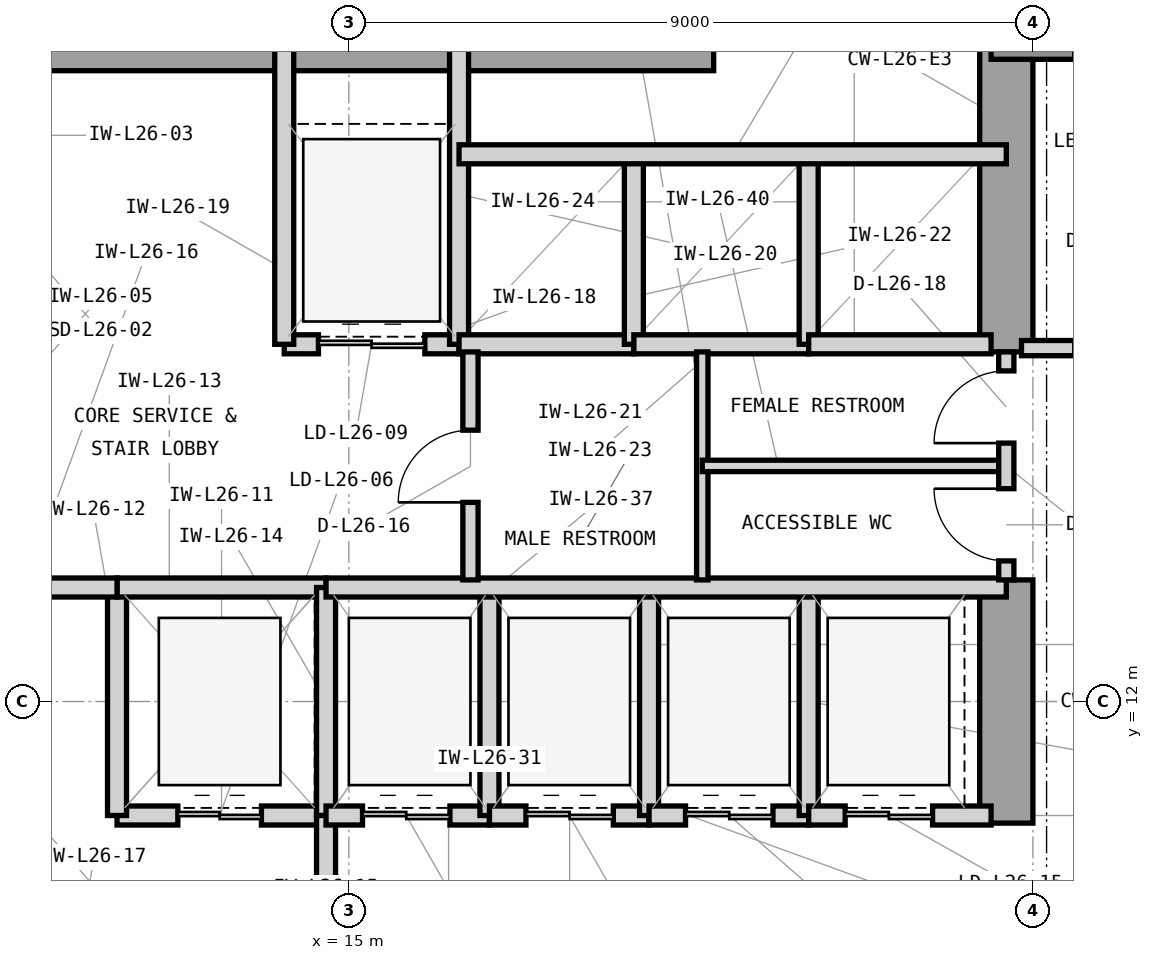
"""IFC4 building model, lengths in metres.
Left out: names, types, materials, properties, quantities, classifications, styles, units other than length and angle.
Written with IfcOpenShell. Run it as: python <this file> out.ifc"""

import sys

from ifc_helpers import new_model, si_unit, direction, frame, frame_2d, origin, origin_2d, place, context, subcontext, project, spatial, rectangle, extrude, element, fill, save


model = new_model("IFC4")
c1 = context("Model", 3, precision=1e-05, world=origin(), true_north=direction((0.0, 1.0)))
c2 = subcontext(c1, "Body", "Model", "MODEL_VIEW")
j1 = project(units=[si_unit("LENGTHUNIT", "METRE"), si_unit("PLANEANGLEUNIT", "RADIAN")], contexts=[c1])
p1 = place(None, origin())
s1 = spatial("IfcSite", under=j1, at=p1, CompositionType="ELEMENT")
p2 = place(p1, origin())
s2 = spatial("IfcBuilding", under=s1, at=p2, CompositionType="ELEMENT")
p3 = place(p2, frame((0.0, 0.0, 112.8)))
s3 = spatial("IfcBuildingStorey", under=s2, at=p3, CompositionType="ELEMENT", Elevation=112.8)
p4 = place(p3, frame((7.475, 20.65, 0.0), z_axis=(0.0, 0.0, 1.0), x_axis=(1.0, 0.0, 0.0)))
e1 = element("IfcWall", 1, at=p4, inside=s3, PredefinedType="SHEAR", context=c2, shape_type="SweptSolid", body=[
    extrude(rectangle(XDim=12.325, YDim=0.7, at=frame_2d((6.163, 0.0))), origin(), (0.0, 0.0, 1.0), 3.9),
])
p5 = place(p3, frame((23.65, 10.4, 0.0), z_axis=(0.0, 0.0, 1.0), x_axis=(0.0, 1.0, 0.0)))
e2 = element("IfcWall", 2, at=p5, inside=s3, PredefinedType="SHEAR", context=c2, shape_type="SweptSolid", body=[
    extrude(rectangle(XDim=3.2, YDim=0.7, at=frame_2d((1.6, 0.0))), origin(), (0.0, 0.0, 1.0), 3.9),
])
p6 = place(p3, frame((23.65, 16.6, 0.0), z_axis=(0.0, 0.0, 1.0), x_axis=(0.0, 1.0, 0.0)))
e3 = element("IfcWall", 3, at=p6, inside=s3, PredefinedType="SHEAR", context=c2, shape_type="SweptSolid", body=[
    extrude(rectangle(XDim=4.05, YDim=0.7, at=frame_2d((2.025, 0.0))), origin(), (0.0, 0.0, 1.0), 3.9),
])
p7 = place(p3, frame((24.0, 21.0, 0.0), z_axis=(0.0, 0.0, 1.0), x_axis=(1.0, 0.0, 0.0)))
e4 = element("IfcColumn", 4, at=p7, inside=s3, PredefinedType="COLUMN", context=c2, shape_type="SweptSolid", body=[
    extrude(rectangle(XDim=1.1, YDim=1.1, at=origin_2d()), origin(), (0.0, 0.0, 1.0), 3.9),
])
p8 = place(p3, frame((11.95, 10.5, 0.0), z_axis=(0.0, 0.0, 1.0), x_axis=(1.0, 0.0, 0.0)))
e5 = element("IfcWall", 5, at=p8, inside=s3, PredefinedType="PARTITIONING", context=c2, shape_type="SweptSolid", body=[
    extrude(rectangle(XDim=2.75, YDim=0.25, at=frame_2d((1.375, 0.0))), origin(), (0.0, 0.0, 1.0), 3.227),
])
p9 = place(p8, frame((0.8, 0.0, 0.0)))
e6 = element("IfcOpeningElement", 6, at=p9, cuts=e5, PredefinedType="OPENING", context=c2, shape_type="SweptSolid", body=[
    extrude(rectangle(XDim=1.1, YDim=2.25, at=frame_2d((0.55, 1.125))), frame((0.0, 0.135, 0.0), z_axis=(0.0, -1.0, 0.0), x_axis=(1.0, 0.0, 0.0)), (0.0, 0.0, 1.0), 0.27),
])
p10 = place(p3, frame((11.95, 10.5, 0.0), z_axis=(0.0, 0.0, 1.0), x_axis=(0.0, 1.0, 0.0)))
e7 = element("IfcWall", 7, at=p10, inside=s3, PredefinedType="PARTITIONING", context=c2, shape_type="SweptSolid", body=[
    extrude(rectangle(XDim=3.0, YDim=0.25, at=frame_2d((1.5, 0.0))), origin(), (0.0, 0.0, 1.0), 3.69),
])
p11 = place(p3, frame((11.95, 13.5, 0.0), z_axis=(0.0, 0.0, 1.0), x_axis=(1.0, 0.0, 0.0)))
e8 = element("IfcWall", 8, at=p11, inside=s3, PredefinedType="PARTITIONING", context=c2, shape_type="SweptSolid", body=[
    extrude(rectangle(XDim=2.75, YDim=0.25, at=frame_2d((1.375, 0.0))), origin(), (0.0, 0.0, 1.0), 3.227),
])
p12 = place(p3, frame((14.7, 10.5, 0.0), z_axis=(0.0, 0.0, 1.0), x_axis=(0.0, 1.0, 0.0)))
e9 = element("IfcWall", 9, at=p12, inside=s3, PredefinedType="PARTITIONING", context=c2, shape_type="SweptSolid", body=[
    extrude(rectangle(XDim=3.0, YDim=0.25, at=frame_2d((1.5, 0.0))), origin(), (0.0, 0.0, 1.0), 3.69),
])
p13 = place(p3, frame((14.7, 6.7, 0.0), z_axis=(0.0, 0.0, 1.0), x_axis=(0.0, 1.0, 0.0)))
e10 = element("IfcWall", 10, at=p13, inside=s3, PredefinedType="PARTITIONING", context=c2, shape_type="SweptSolid", body=[
    extrude(rectangle(XDim=3.8, YDim=0.25, at=frame_2d((1.9, 0.0))), origin(), (0.0, 0.0, 1.0), 3.69),
])
p14 = place(p13, frame((1.3, 0.0, 0.0)))
e11 = element("IfcOpeningElement", 11, at=p14, cuts=e10, PredefinedType="OPENING", context=c2, shape_type="SweptSolid", body=[
    extrude(rectangle(XDim=1.2, YDim=2.2, at=frame_2d((0.6, 1.1))), frame((0.0, 0.135, 0.0), z_axis=(0.0, -1.0, 0.0), x_axis=(1.0, 0.0, 0.0)), (0.0, 0.0, 1.0), 0.27),
])
p15 = place(p3, frame((10.33, 13.5, 0.0), z_axis=(0.0, 0.0, 1.0), x_axis=(1.0, 0.0, 0.0)))
e12 = element("IfcWall", 12, at=p15, inside=s3, PredefinedType="PARTITIONING", context=c2, shape_type="SweptSolid", body=[
    extrude(rectangle(XDim=1.62, YDim=0.25, at=frame_2d((0.81, 0.0))), origin(), (0.0, 0.0, 1.0), 3.227),
])
p16 = place(p3, frame((14.15, 16.7, 0.0), z_axis=(0.0, 0.0, 1.0), x_axis=(1.0, 0.0, 0.0)))
e13 = element("IfcWall", 13, at=p16, inside=s3, PredefinedType="PARTITIONING", context=c2, shape_type="SweptSolid", body=[
    extrude(rectangle(XDim=2.3, YDim=0.25, at=frame_2d((1.15, 0.0))), origin(), (0.0, 0.0, 1.0), 3.227),
])
p17 = place(p16, frame((0.45, 0.0, 0.0)))
e14 = element("IfcOpeningElement", 14, at=p17, cuts=e13, PredefinedType="OPENING", context=c2, shape_type="SweptSolid", body=[
    extrude(rectangle(XDim=1.4, YDim=2.35, at=frame_2d((0.7, 1.175))), frame((0.0, 0.135, 0.0), z_axis=(0.0, -1.0, 0.0), x_axis=(1.0, 0.0, 0.0)), (0.0, 0.0, 1.0), 0.27),
])
for number, where, z_axis, x_axis in (
    (15, (14.15, 16.7, 0.0), (0.0, 0.0, 1.0), (0.0, 1.0, 0.0)),
    (16, (16.45, 16.7, 0.0), (0.0, 0.0, 1.0), (0.0, 1.0, 0.0)),
):
    element("IfcWall", number, at=place(p3, frame(where, z_axis=z_axis, x_axis=x_axis)), inside=s3, PredefinedType="PARTITIONING", context=c2, shape_type="SweptSolid", body=[
        extrude(rectangle(XDim=3.95, YDim=0.25, at=frame_2d((1.975, 0.0))), origin(), (0.0, 0.0, 1.0), 3.69),
    ])
p18 = place(p3, frame((16.45, 16.7, 0.0), z_axis=(0.0, 0.0, 1.0), x_axis=(1.0, 0.0, 0.0)))
e17 = element("IfcWall", 17, at=p18, inside=s3, PredefinedType="PARTITIONING", context=c2, shape_type="SweptSolid", body=[
    extrude(rectangle(XDim=2.3, YDim=0.25, at=frame_2d((1.15, 0.0))), origin(), (0.0, 0.0, 1.0), 3.227),
])
p19 = place(p3, frame((18.75, 16.7, 0.0), z_axis=(0.0, 0.0, 1.0), x_axis=(0.0, 1.0, 0.0)))
e18 = element("IfcWall", 18, at=p19, inside=s3, PredefinedType="PARTITIONING", context=c2, shape_type="SweptSolid", body=[
    extrude(rectangle(XDim=2.5, YDim=0.25, at=frame_2d((1.25, 0.0))), origin(), (0.0, 0.0, 1.0), 3.69),
])
p20 = place(p3, frame((18.75, 16.7, 0.0), z_axis=(0.0, 0.0, 1.0), x_axis=(1.0, 0.0, 0.0)))
e19 = element("IfcWall", 19, at=p20, inside=s3, PredefinedType="PARTITIONING", context=c2, shape_type="SweptSolid", body=[
    extrude(rectangle(XDim=2.3, YDim=0.25, at=frame_2d((1.15, 0.0))), origin(), (0.0, 0.0, 1.0), 3.227),
])
p21 = place(p3, frame((21.05, 16.7, 0.0), z_axis=(0.0, 0.0, 1.0), x_axis=(0.0, 1.0, 0.0)))
e20 = element("IfcWall", 20, at=p21, inside=s3, PredefinedType="PARTITIONING", context=c2, shape_type="SweptSolid", body=[
    extrude(rectangle(XDim=2.5, YDim=0.25, at=frame_2d((1.25, 0.0))), origin(), (0.0, 0.0, 1.0), 3.69),
])
p22 = place(p3, frame((21.05, 16.7, 0.0), z_axis=(0.0, 0.0, 1.0), x_axis=(1.0, 0.0, 0.0)))
e21 = element("IfcWall", 21, at=p22, inside=s3, PredefinedType="PARTITIONING", context=c2, shape_type="SweptSolid", body=[
    extrude(rectangle(XDim=2.4, YDim=0.25, at=frame_2d((1.2, 0.0))), origin(), (0.0, 0.0, 1.0), 3.227),
])
p23 = place(p3, frame((16.45, 19.2, 0.0), z_axis=(0.0, 0.0, 1.0), x_axis=(1.0, 0.0, 0.0)))
e22 = element("IfcWall", 22, at=p23, inside=s3, PredefinedType="PARTITIONING", context=c2, shape_type="SweptSolid", body=[
    extrude(rectangle(XDim=7.2, YDim=0.25, at=frame_2d((3.6, 0.0))), origin(), (0.0, 0.0, 1.0), 3.69),
])
p24 = place(p3, frame((14.7, 10.5, 0.0), z_axis=(0.0, 0.0, 1.0), x_axis=(1.0, 0.0, 0.0)))
e23 = element("IfcWall", 23, at=p24, inside=s3, PredefinedType="PARTITIONING", context=c2, shape_type="SweptSolid", body=[
    extrude(rectangle(XDim=2.15, YDim=0.25, at=frame_2d((1.075, 0.0))), origin(), (0.0, 0.0, 1.0), 3.227),
])
p25 = place(p24, frame((0.48, 0.0, 0.0)))
e24 = element("IfcOpeningElement", 24, at=p25, cuts=e23, PredefinedType="OPENING", context=c2, shape_type="SweptSolid", body=[
    extrude(rectangle(XDim=1.15, YDim=2.25, at=frame_2d((0.575, 1.125))), frame((0.0, 0.135, 0.0), z_axis=(0.0, -1.0, 0.0), x_axis=(1.0, 0.0, 0.0)), (0.0, 0.0, 1.0), 0.27),
])
p26 = place(p3, frame((16.85, 10.5, 0.0), z_axis=(0.0, 0.0, 1.0), x_axis=(0.0, 1.0, 0.0)))
e25 = element("IfcWall", 25, at=p26, inside=s3, PredefinedType="PARTITIONING", context=c2, shape_type="SweptSolid", body=[
    extrude(rectangle(XDim=3.0, YDim=0.25, at=frame_2d((1.5, 0.0))), origin(), (0.0, 0.0, 1.0), 3.69),
])
p27 = place(p3, frame((16.85, 10.5, 0.0), z_axis=(0.0, 0.0, 1.0), x_axis=(1.0, 0.0, 0.0)))
e26 = element("IfcWall", 26, at=p27, inside=s3, PredefinedType="PARTITIONING", context=c2, shape_type="SweptSolid", body=[
    extrude(rectangle(XDim=2.1, YDim=0.25, at=frame_2d((1.05, 0.0))), origin(), (0.0, 0.0, 1.0), 3.227),
])
p28 = place(p27, frame((0.48, 0.0, 0.0)))
e27 = element("IfcOpeningElement", 27, at=p28, cuts=e26, PredefinedType="OPENING", context=c2, shape_type="SweptSolid", body=[
    extrude(rectangle(XDim=1.15, YDim=2.25, at=frame_2d((0.575, 1.125))), frame((0.0, 0.135, 0.0), z_axis=(0.0, -1.0, 0.0), x_axis=(1.0, 0.0, 0.0)), (0.0, 0.0, 1.0), 0.27),
])
p29 = place(p3, frame((18.95, 10.5, 0.0), z_axis=(0.0, 0.0, 1.0), x_axis=(0.0, 1.0, 0.0)))
e28 = element("IfcWall", 28, at=p29, inside=s3, PredefinedType="PARTITIONING", context=c2, shape_type="SweptSolid", body=[
    extrude(rectangle(XDim=3.0, YDim=0.25, at=frame_2d((1.5, 0.0))), origin(), (0.0, 0.0, 1.0), 3.69),
])
p30 = place(p3, frame((18.95, 10.5, 0.0), z_axis=(0.0, 0.0, 1.0), x_axis=(1.0, 0.0, 0.0)))
e29 = element("IfcWall", 29, at=p30, inside=s3, PredefinedType="PARTITIONING", context=c2, shape_type="SweptSolid", body=[
    extrude(rectangle(XDim=2.1, YDim=0.25, at=frame_2d((1.05, 0.0))), origin(), (0.0, 0.0, 1.0), 3.227),
])
p31 = place(p30, frame((0.48, 0.0, 0.0)))
e30 = element("IfcOpeningElement", 30, at=p31, cuts=e29, PredefinedType="OPENING", context=c2, shape_type="SweptSolid", body=[
    extrude(rectangle(XDim=1.15, YDim=2.25, at=frame_2d((0.575, 1.125))), frame((0.0, 0.135, 0.0), z_axis=(0.0, -1.0, 0.0), x_axis=(1.0, 0.0, 0.0)), (0.0, 0.0, 1.0), 0.27),
])
p32 = place(p3, frame((21.05, 10.5, 0.0), z_axis=(0.0, 0.0, 1.0), x_axis=(0.0, 1.0, 0.0)))
e31 = element("IfcWall", 31, at=p32, inside=s3, PredefinedType="PARTITIONING", context=c2, shape_type="SweptSolid", body=[
    extrude(rectangle(XDim=3.0, YDim=0.25, at=frame_2d((1.5, 0.0))), origin(), (0.0, 0.0, 1.0), 3.69),
])
p33 = place(p3, frame((21.05, 10.5, 0.0), z_axis=(0.0, 0.0, 1.0), x_axis=(1.0, 0.0, 0.0)))
e32 = element("IfcWall", 32, at=p33, inside=s3, PredefinedType="PARTITIONING", context=c2, shape_type="SweptSolid", body=[
    extrude(rectangle(XDim=2.4, YDim=0.25, at=frame_2d((1.2, 0.0))), origin(), (0.0, 0.0, 1.0), 3.227),
])
p34 = place(p33, frame((0.48, 0.0, 0.0)))
e33 = element("IfcOpeningElement", 33, at=p34, cuts=e32, PredefinedType="OPENING", context=c2, shape_type="SweptSolid", body=[
    extrude(rectangle(XDim=1.15, YDim=2.25, at=frame_2d((0.575, 1.125))), frame((0.0, 0.135, 0.0), z_axis=(0.0, -1.0, 0.0), x_axis=(1.0, 0.0, 0.0)), (0.0, 0.0, 1.0), 0.27),
])
p35 = place(p3, frame((14.7, 13.5, 0.0), z_axis=(0.0, 0.0, 1.0), x_axis=(1.0, 0.0, 0.0)))
e34 = element("IfcWall", 34, at=p35, inside=s3, PredefinedType="PARTITIONING", context=c2, shape_type="SweptSolid", body=[
    extrude(rectangle(XDim=8.95, YDim=0.25, at=frame_2d((4.475, 0.0))), origin(), (0.0, 0.0, 1.0), 3.227),
])
p36 = place(p3, frame((16.6, 13.6, 0.0), z_axis=(0.0, 0.0, 1.0), x_axis=(0.0, 1.0, 0.0)))
e35 = element("IfcWall", 35, at=p36, inside=s3, PredefinedType="PARTITIONING", context=c2, shape_type="SweptSolid", body=[
    extrude(rectangle(XDim=3.0, YDim=0.2, at=frame_2d((1.5, 0.0))), origin(), (0.0, 0.0, 1.0), 3.69),
])
p37 = place(p36, frame((1.02, 0.0, 0.0)))
e36 = element("IfcOpeningElement", 36, at=p37, cuts=e35, PredefinedType="OPENING", context=c2, shape_type="SweptSolid", body=[
    extrude(rectangle(XDim=0.95, YDim=2.1, at=frame_2d((0.475, 1.05))), frame((0.0, 0.11, 0.0), z_axis=(0.0, -1.0, 0.0), x_axis=(1.0, 0.0, 0.0)), (0.0, 0.0, 1.0), 0.22),
])
p38 = place(p3, frame((19.65, 13.6, 0.0), z_axis=(0.0, 0.0, 1.0), x_axis=(0.0, 1.0, 0.0)))
e37 = element("IfcWall", 37, at=p38, inside=s3, PredefinedType="PARTITIONING", context=c2, shape_type="SweptSolid", body=[
    extrude(rectangle(XDim=3.0, YDim=0.15, at=frame_2d((1.5, 0.0))), origin(), (0.0, 0.0, 1.0), 3.69),
])
p39 = place(p3, frame((19.65, 15.1, 0.0), z_axis=(0.0, 0.0, 1.0), x_axis=(1.0, 0.0, 0.0)))
e38 = element("IfcWall", 38, at=p39, inside=s3, PredefinedType="PARTITIONING", context=c2, shape_type="SweptSolid", body=[
    extrude(rectangle(XDim=4.0, YDim=0.15, at=frame_2d((2.0, 0.0))), origin(), (0.0, 0.0, 1.0), 3.69),
])
p40 = place(p3, frame((23.65, 13.6, 0.0), z_axis=(0.0, 0.0, 1.0), x_axis=(0.0, 1.0, 0.0)))
e39 = element("IfcWall", 39, at=p40, inside=s3, PredefinedType="PARTITIONING", context=c2, shape_type="SweptSolid", body=[
    extrude(rectangle(XDim=3.0, YDim=0.2, at=frame_2d((1.5, 0.0))), origin(), (0.0, 0.0, 1.0), 3.69),
])
p41 = place(p40, frame((0.25, 0.0, 0.0)))
e40 = element("IfcOpeningElement", 40, at=p41, cuts=e39, PredefinedType="OPENING", context=c2, shape_type="SweptSolid", body=[
    extrude(rectangle(XDim=0.95, YDim=2.1, at=frame_2d((0.475, 1.05))), frame((0.0, 0.11, 0.0), z_axis=(0.0, -1.0, 0.0), x_axis=(1.0, 0.0, 0.0)), (0.0, 0.0, 1.0), 0.22),
])
p42 = place(p40, frame((1.8, 0.0, 0.0)))
e41 = element("IfcOpeningElement", 41, at=p42, cuts=e39, PredefinedType="OPENING", context=c2, shape_type="SweptSolid", body=[
    extrude(rectangle(XDim=0.95, YDim=2.1, at=frame_2d((0.475, 1.05))), frame((0.0, 0.11, 0.0), z_axis=(0.0, -1.0, 0.0), x_axis=(1.0, 0.0, 0.0)), (0.0, 0.0, 1.0), 0.22),
])
p43 = place(p3, frame((23.85, 16.65, 0.0), z_axis=(0.0, 0.0, 1.0), x_axis=(1.0, 0.0, 0.0)))
e42 = element("IfcWall", 42, at=p43, inside=s3, PredefinedType="PARTITIONING", context=c2, shape_type="SweptSolid", body=[
    extrude(rectangle(XDim=2.85, YDim=0.2, at=frame_2d((1.425, 0.0))), origin(), (0.0, 0.0, 1.0), 3.69),
])
p44 = place(p43, frame((0.7, 0.0, 0.0)))
e43 = element("IfcOpeningElement", 43, at=p44, cuts=e42, PredefinedType="OPENING", context=c2, shape_type="SweptSolid", body=[
    extrude(rectangle(XDim=1.0, YDim=2.15, at=frame_2d((0.5, 1.075))), frame((0.0, 0.11, 0.0), z_axis=(0.0, -1.0, 0.0), x_axis=(1.0, 0.0, 0.0)), (0.0, 0.0, 1.0), 0.22),
])
p45 = place(p9, origin())
e44 = element("IfcDoor", 44, at=p45, inside=s3, OperationType="DOUBLE_DOOR_SLIDING", PredefinedType="DOOR", context=c2, shape_type="SweptSolid", body=[
    extrude(rectangle(XDim=1.1, YDim=2.25, at=frame_2d((0.55, 1.125))), frame((0.0, 0.025, 0.0), z_axis=(0.0, -1.0, 0.0), x_axis=(1.0, 0.0, 0.0)), (0.0, 0.0, 1.0), 0.05),
])
fill(e6, e44)
p46 = place(p17, origin())
e45 = element("IfcDoor", 45, at=p46, inside=s3, OperationType="DOUBLE_DOOR_SLIDING", PredefinedType="DOOR", context=c2, shape_type="SweptSolid", body=[
    extrude(rectangle(XDim=1.4, YDim=2.35, at=frame_2d((0.7, 1.175))), frame((0.0, 0.025, 0.0), z_axis=(0.0, -1.0, 0.0), x_axis=(1.0, 0.0, 0.0)), (0.0, 0.0, 1.0), 0.05),
])
fill(e14, e45)
p47 = place(p25, origin())
e46 = element("IfcDoor", 46, at=p47, inside=s3, OperationType="DOUBLE_DOOR_SLIDING", PredefinedType="DOOR", context=c2, shape_type="SweptSolid", body=[
    extrude(rectangle(XDim=1.15, YDim=2.25, at=frame_2d((0.575, 1.125))), frame((0.0, 0.025, 0.0), z_axis=(0.0, -1.0, 0.0), x_axis=(1.0, 0.0, 0.0)), (0.0, 0.0, 1.0), 0.05),
])
fill(e24, e46)
p48 = place(p28, origin())
e47 = element("IfcDoor", 47, at=p48, inside=s3, OperationType="DOUBLE_DOOR_SLIDING", PredefinedType="DOOR", context=c2, shape_type="SweptSolid", body=[
    extrude(rectangle(XDim=1.15, YDim=2.25, at=frame_2d((0.575, 1.125))), frame((0.0, 0.025, 0.0), z_axis=(0.0, -1.0, 0.0), x_axis=(1.0, 0.0, 0.0)), (0.0, 0.0, 1.0), 0.05),
])
fill(e27, e47)
p49 = place(p31, origin())
e48 = element("IfcDoor", 48, at=p49, inside=s3, OperationType="DOUBLE_DOOR_SLIDING", PredefinedType="DOOR", context=c2, shape_type="SweptSolid", body=[
    extrude(rectangle(XDim=1.15, YDim=2.25, at=frame_2d((0.575, 1.125))), frame((0.0, 0.025, 0.0), z_axis=(0.0, -1.0, 0.0), x_axis=(1.0, 0.0, 0.0)), (0.0, 0.0, 1.0), 0.05),
])
fill(e30, e48)
p50 = place(p34, origin())
e49 = element("IfcDoor", 49, at=p50, inside=s3, OperationType="DOUBLE_DOOR_SLIDING", PredefinedType="DOOR", context=c2, shape_type="SweptSolid", body=[
    extrude(rectangle(XDim=1.15, YDim=2.25, at=frame_2d((0.575, 1.125))), frame((0.0, 0.025, 0.0), z_axis=(0.0, -1.0, 0.0), x_axis=(1.0, 0.0, 0.0)), (0.0, 0.0, 1.0), 0.05),
])
fill(e33, e49)
p51 = place(p37, origin())
e50 = element("IfcDoor", 50, at=p51, inside=s3, OperationType="SINGLE_SWING_LEFT", PredefinedType="DOOR", context=c2, shape_type="SweptSolid", body=[
    extrude(rectangle(XDim=0.95, YDim=2.1, at=frame_2d((0.475, 1.05))), frame((0.0, 0.025, 0.0), z_axis=(0.0, -1.0, 0.0), x_axis=(1.0, 0.0, 0.0)), (0.0, 0.0, 1.0), 0.05),
])
fill(e36, e50)
p52 = place(p41, origin())
e51 = element("IfcDoor", 51, at=p52, inside=s3, OperationType="SINGLE_SWING_RIGHT", PredefinedType="DOOR", context=c2, shape_type="SweptSolid", body=[
    extrude(rectangle(XDim=0.95, YDim=2.1, at=frame_2d((0.475, 1.05))), frame((0.0, 0.025, 0.0), z_axis=(0.0, -1.0, 0.0), x_axis=(1.0, 0.0, 0.0)), (0.0, 0.0, 1.0), 0.05),
])
fill(e40, e51)
p53 = place(p42, origin())
e52 = element("IfcDoor", 52, at=p53, inside=s3, OperationType="SINGLE_SWING_LEFT", PredefinedType="DOOR", context=c2, shape_type="SweptSolid", body=[
    extrude(rectangle(XDim=0.95, YDim=2.1, at=frame_2d((0.475, 1.05))), frame((0.0, 0.025, 0.0), z_axis=(0.0, -1.0, 0.0), x_axis=(1.0, 0.0, 0.0)), (0.0, 0.0, 1.0), 0.05),
])
fill(e41, e52)
save(model, sys.argv[1])
